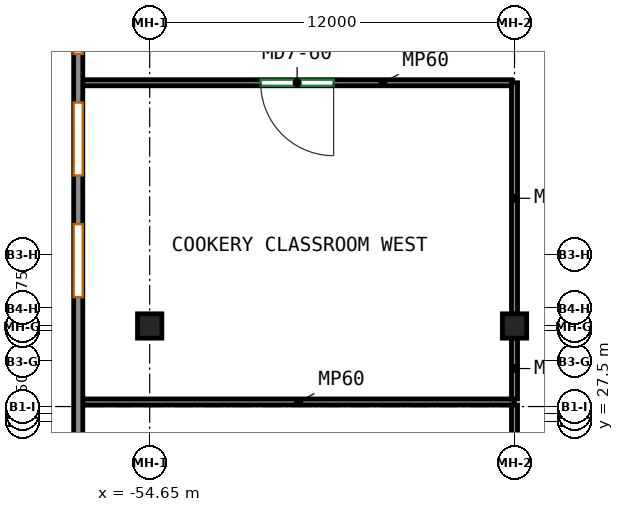
"""IFC4 building model, lengths in metres.
Left out: names, types, materials, properties, quantities, classifications, styles, units other than length and angle.
Written with IfcOpenShell. Run it as: python <this file> out.ifc"""

import sys

from ifc_helpers import new_model, si_unit, direction, frame, frame_2d, origin, origin_2d, place, context, subcontext, project, spatial, rectangle, extrude, source, transform, mapped, element, fill, save


model = new_model("IFC4")
c1 = context("Model", 3, precision=1e-05, world=origin(), true_north=direction((0.0, 1.0)))
c2 = subcontext(c1, "Body", "Model", "MODEL_VIEW")
j1 = project(units=[si_unit("LENGTHUNIT", "METRE"), si_unit("PLANEANGLEUNIT", "RADIAN")], contexts=[c1])
p1 = place(None, origin())
s1 = spatial("IfcSite", under=j1, at=p1, CompositionType="ELEMENT")
p2 = place(p1, origin())
s2 = spatial("IfcBuilding", under=s1, at=p2, CompositionType="ELEMENT")
p3 = place(p2, frame((0.0, 0.0, 13.5)))
s3 = spatial("IfcBuildingStorey", under=s2, at=p3, CompositionType="ELEMENT", Elevation=13.5)
m1 = source(origin(), c2, "Body", "SweptSolid", [
    extrude(rectangle(XDim=0.8, YDim=0.8, at=origin_2d()), origin(), (0.0, 0.0, 1.0), 4.1),
])
for number, where, z_axis, x_axis in (
    (1, (-54.65, 30.65, 0.0), (0.0, 0.0, 1.0), (1.0, 0.0, 0.0)),
    (2, (-42.65, 30.65, 0.0), (0.0, 0.0, 1.0), (1.0, 0.0, 0.0)),
):
    element("IfcColumn", number, at=place(p3, frame(where, z_axis=z_axis, x_axis=x_axis)), inside=s3, PredefinedType="COLUMN", context=c2, shape_type="MappedRepresentation", body=[
        mapped(m1, transform((0.0, 0.0, 0.0))),
    ])
m2 = source(origin(), c2, "Body", "SweptSolid", [
    extrude(rectangle(XDim=100.7, YDim=0.3, at=frame_2d((50.35, 0.0))), origin(), (0.0, 0.0, 1.0), 4.1),
])
p4 = place(p3, frame((-57.0, -43.55, 0.0), z_axis=(0.0, 0.0, 1.0), x_axis=(0.0, 1.0, 0.0)))
e3 = element("IfcWall", 3, at=p4, inside=s3, PredefinedType="SOLIDWALL", context=c2, shape_type="MappedRepresentation", body=[
    mapped(m2, transform((0.0, 0.0, 0.0))),
])
p5 = place(p4, frame((3.15, 0.0, 0.9)))
e4 = element("IfcOpeningElement", 4, at=p5, cuts=e3, PredefinedType="OPENING", context=c2, shape_type="SweptSolid", body=[
    extrude(rectangle(XDim=2.4, YDim=1.8, at=frame_2d((1.2, 0.9))), frame((0.0, 0.16, 0.0), z_axis=(0.0, -1.0, 0.0), x_axis=(1.0, 0.0, 0.0)), (0.0, 0.0, 1.0), 0.32),
])
p6 = place(p4, frame((7.15, 0.0, 0.9)))
e5 = element("IfcOpeningElement", 5, at=p6, cuts=e3, PredefinedType="OPENING", context=c2, shape_type="SweptSolid", body=[
    extrude(rectangle(XDim=2.4, YDim=1.8, at=frame_2d((1.2, 0.9))), frame((0.0, 0.16, 0.0), z_axis=(0.0, -1.0, 0.0), x_axis=(1.0, 0.0, 0.0)), (0.0, 0.0, 1.0), 0.32),
])
p7 = place(p4, frame((11.15, 0.0, 0.9)))
e6 = element("IfcOpeningElement", 6, at=p7, cuts=e3, PredefinedType="OPENING", context=c2, shape_type="SweptSolid", body=[
    extrude(rectangle(XDim=2.4, YDim=1.8, at=frame_2d((1.2, 0.9))), frame((0.0, 0.16, 0.0), z_axis=(0.0, -1.0, 0.0), x_axis=(1.0, 0.0, 0.0)), (0.0, 0.0, 1.0), 0.32),
])
p8 = place(p4, frame((19.15, 0.0, 0.9)))
e7 = element("IfcOpeningElement", 7, at=p8, cuts=e3, PredefinedType="OPENING", context=c2, shape_type="SweptSolid", body=[
    extrude(rectangle(XDim=2.4, YDim=1.8, at=frame_2d((1.2, 0.9))), frame((0.0, 0.16, 0.0), z_axis=(0.0, -1.0, 0.0), x_axis=(1.0, 0.0, 0.0)), (0.0, 0.0, 1.0), 0.32),
])
p9 = place(p4, frame((23.15, 0.0, 0.9)))
e8 = element("IfcOpeningElement", 8, at=p9, cuts=e3, PredefinedType="OPENING", context=c2, shape_type="SweptSolid", body=[
    extrude(rectangle(XDim=2.4, YDim=1.8, at=frame_2d((1.2, 0.9))), frame((0.0, 0.16, 0.0), z_axis=(0.0, -1.0, 0.0), x_axis=(1.0, 0.0, 0.0)), (0.0, 0.0, 1.0), 0.32),
])
p10 = place(p4, frame((27.15, 0.0, 0.9)))
e9 = element("IfcOpeningElement", 9, at=p10, cuts=e3, PredefinedType="OPENING", context=c2, shape_type="SweptSolid", body=[
    extrude(rectangle(XDim=2.4, YDim=1.8, at=frame_2d((1.2, 0.9))), frame((0.0, 0.16, 0.0), z_axis=(0.0, -1.0, 0.0), x_axis=(1.0, 0.0, 0.0)), (0.0, 0.0, 1.0), 0.32),
])
p11 = place(p4, frame((31.15, 0.0, 0.9)))
e10 = element("IfcOpeningElement", 10, at=p11, cuts=e3, PredefinedType="OPENING", context=c2, shape_type="SweptSolid", body=[
    extrude(rectangle(XDim=2.4, YDim=1.8, at=frame_2d((1.2, 0.9))), frame((0.0, 0.16, 0.0), z_axis=(0.0, -1.0, 0.0), x_axis=(1.0, 0.0, 0.0)), (0.0, 0.0, 1.0), 0.32),
])
p12 = place(p4, frame((39.15, 0.0, 0.9)))
e11 = element("IfcOpeningElement", 11, at=p12, cuts=e3, PredefinedType="OPENING", context=c2, shape_type="SweptSolid", body=[
    extrude(rectangle(XDim=2.4, YDim=1.8, at=frame_2d((1.2, 0.9))), frame((0.0, 0.16, 0.0), z_axis=(0.0, -1.0, 0.0), x_axis=(1.0, 0.0, 0.0)), (0.0, 0.0, 1.0), 0.32),
])
p13 = place(p4, frame((43.15, 0.0, 0.9)))
e12 = element("IfcOpeningElement", 12, at=p13, cuts=e3, PredefinedType="OPENING", context=c2, shape_type="SweptSolid", body=[
    extrude(rectangle(XDim=2.4, YDim=1.8, at=frame_2d((1.2, 0.9))), frame((0.0, 0.16, 0.0), z_axis=(0.0, -1.0, 0.0), x_axis=(1.0, 0.0, 0.0)), (0.0, 0.0, 1.0), 0.32),
])
p14 = place(p4, frame((51.15, 0.0, 0.9)))
e13 = element("IfcOpeningElement", 13, at=p14, cuts=e3, PredefinedType="OPENING", context=c2, shape_type="SweptSolid", body=[
    extrude(rectangle(XDim=2.4, YDim=1.8, at=frame_2d((1.2, 0.9))), frame((0.0, 0.16, 0.0), z_axis=(0.0, -1.0, 0.0), x_axis=(1.0, 0.0, 0.0)), (0.0, 0.0, 1.0), 0.32),
])
p15 = place(p4, frame((55.15, 0.0, 0.9)))
e14 = element("IfcOpeningElement", 14, at=p15, cuts=e3, PredefinedType="OPENING", context=c2, shape_type="SweptSolid", body=[
    extrude(rectangle(XDim=2.4, YDim=1.8, at=frame_2d((1.2, 0.9))), frame((0.0, 0.16, 0.0), z_axis=(0.0, -1.0, 0.0), x_axis=(1.0, 0.0, 0.0)), (0.0, 0.0, 1.0), 0.32),
])
p16 = place(p4, frame((59.15, 0.0, 0.9)))
e15 = element("IfcOpeningElement", 15, at=p16, cuts=e3, PredefinedType="OPENING", context=c2, shape_type="SweptSolid", body=[
    extrude(rectangle(XDim=2.4, YDim=1.8, at=frame_2d((1.2, 0.9))), frame((0.0, 0.16, 0.0), z_axis=(0.0, -1.0, 0.0), x_axis=(1.0, 0.0, 0.0)), (0.0, 0.0, 1.0), 0.32),
])
p17 = place(p4, frame((63.15, 0.0, 0.9)))
e16 = element("IfcOpeningElement", 16, at=p17, cuts=e3, PredefinedType="OPENING", context=c2, shape_type="SweptSolid", body=[
    extrude(rectangle(XDim=2.4, YDim=1.8, at=frame_2d((1.2, 0.9))), frame((0.0, 0.16, 0.0), z_axis=(0.0, -1.0, 0.0), x_axis=(1.0, 0.0, 0.0)), (0.0, 0.0, 1.0), 0.32),
])
p18 = place(p4, frame((67.15, 0.0, 0.9)))
e17 = element("IfcOpeningElement", 17, at=p18, cuts=e3, PredefinedType="OPENING", context=c2, shape_type="SweptSolid", body=[
    extrude(rectangle(XDim=2.4, YDim=1.8, at=frame_2d((1.2, 0.9))), frame((0.0, 0.16, 0.0), z_axis=(0.0, -1.0, 0.0), x_axis=(1.0, 0.0, 0.0)), (0.0, 0.0, 1.0), 0.32),
])
p19 = place(p4, frame((75.15, 0.0, 0.9)))
e18 = element("IfcOpeningElement", 18, at=p19, cuts=e3, PredefinedType="OPENING", context=c2, shape_type="SweptSolid", body=[
    extrude(rectangle(XDim=2.4, YDim=1.8, at=frame_2d((1.2, 0.9))), frame((0.0, 0.16, 0.0), z_axis=(0.0, -1.0, 0.0), x_axis=(1.0, 0.0, 0.0)), (0.0, 0.0, 1.0), 0.32),
])
p20 = place(p4, frame((79.15, 0.0, 0.9)))
e19 = element("IfcOpeningElement", 19, at=p20, cuts=e3, PredefinedType="OPENING", context=c2, shape_type="SweptSolid", body=[
    extrude(rectangle(XDim=2.4, YDim=1.8, at=frame_2d((1.2, 0.9))), frame((0.0, 0.16, 0.0), z_axis=(0.0, -1.0, 0.0), x_axis=(1.0, 0.0, 0.0)), (0.0, 0.0, 1.0), 0.32),
])
p21 = place(p4, frame((83.15, 0.0, 0.9)))
e20 = element("IfcOpeningElement", 20, at=p21, cuts=e3, PredefinedType="OPENING", context=c2, shape_type="SweptSolid", body=[
    extrude(rectangle(XDim=2.4, YDim=1.8, at=frame_2d((1.2, 0.9))), frame((0.0, 0.16, 0.0), z_axis=(0.0, -1.0, 0.0), x_axis=(1.0, 0.0, 0.0)), (0.0, 0.0, 1.0), 0.32),
])
p22 = place(p4, frame((87.15, 0.0, 0.9)))
e21 = element("IfcOpeningElement", 21, at=p22, cuts=e3, PredefinedType="OPENING", context=c2, shape_type="SweptSolid", body=[
    extrude(rectangle(XDim=2.4, YDim=1.8, at=frame_2d((1.2, 0.9))), frame((0.0, 0.16, 0.0), z_axis=(0.0, -1.0, 0.0), x_axis=(1.0, 0.0, 0.0)), (0.0, 0.0, 1.0), 0.32),
])
p23 = place(p4, frame((91.15, 0.0, 0.9)))
e22 = element("IfcOpeningElement", 22, at=p23, cuts=e3, PredefinedType="OPENING", context=c2, shape_type="SweptSolid", body=[
    extrude(rectangle(XDim=2.4, YDim=1.8, at=frame_2d((1.2, 0.9))), frame((0.0, 0.16, 0.0), z_axis=(0.0, -1.0, 0.0), x_axis=(1.0, 0.0, 0.0)), (0.0, 0.0, 1.0), 0.32),
])
p24 = place(p4, frame((95.15, 0.0, 0.9)))
e23 = element("IfcOpeningElement", 23, at=p24, cuts=e3, PredefinedType="OPENING", context=c2, shape_type="SweptSolid", body=[
    extrude(rectangle(XDim=2.4, YDim=1.8, at=frame_2d((1.2, 0.9))), frame((0.0, 0.16, 0.0), z_axis=(0.0, -1.0, 0.0), x_axis=(1.0, 0.0, 0.0)), (0.0, 0.0, 1.0), 0.32),
])
m3 = source(origin(), c2, "Body", "SweptSolid", [
    extrude(rectangle(XDim=14.2, YDim=0.2, at=frame_2d((7.1, 0.0))), origin(), (0.0, 0.0, 1.0), 3.3),
])
p25 = place(p3, frame((-56.85, 28.15, 0.0), z_axis=(0.0, 0.0, 1.0), x_axis=(1.0, 0.0, 0.0)))
e24 = element("IfcWall", 24, at=p25, inside=s3, PredefinedType="PARTITIONING", context=c2, shape_type="MappedRepresentation", body=[
    mapped(m3, transform((0.0, 0.0, 0.0))),
])
m4 = source(origin(), c2, "Body", "SweptSolid", [
    extrude(rectangle(XDim=10.3, YDim=0.2, at=frame_2d((5.15, 0.0))), origin(), (0.0, 0.0, 1.0), 3.3),
])
p26 = place(p3, frame((-42.65, 17.75, 0.0), z_axis=(0.0, 0.0, 1.0), x_axis=(0.0, 1.0, 0.0)))
e25 = element("IfcWall", 25, at=p26, inside=s3, PredefinedType="PARTITIONING", context=c2, shape_type="MappedRepresentation", body=[
    mapped(m4, transform((0.0, 0.0, 0.0))),
])
p27 = place(p26, frame((3.95, 0.0, 0.0)))
e26 = element("IfcOpeningElement", 26, at=p27, cuts=e25, PredefinedType="OPENING", context=c2, shape_type="SweptSolid", body=[
    extrude(rectangle(XDim=2.4, YDim=2.4, at=frame_2d((1.2, 1.2))), frame((0.0, 0.11, 0.0), z_axis=(0.0, -1.0, 0.0), x_axis=(1.0, 0.0, 0.0)), (0.0, 0.0, 1.0), 0.22),
])
m5 = source(origin(), c2, "Body", "SweptSolid", [
    extrude(rectangle(XDim=2.0, YDim=0.2, at=frame_2d((1.0, 0.0))), origin(), (0.0, 0.0, 1.0), 3.3),
])
p28 = place(p3, frame((-42.65, 28.25, 0.0), z_axis=(0.0, 0.0, 1.0), x_axis=(0.0, 1.0, 0.0)))
e27 = element("IfcWall", 27, at=p28, inside=s3, PredefinedType="PARTITIONING", context=c2, shape_type="MappedRepresentation", body=[
    mapped(m5, transform((0.0, 0.0, 0.0))),
])
m6 = source(origin(), c2, "Body", "SweptSolid", [
    extrude(rectangle(XDim=7.6, YDim=0.2, at=frame_2d((3.8, 0.0))), origin(), (0.0, 0.0, 1.0), 3.3),
])
p29 = place(p3, frame((-42.65, 31.05, 0.0), z_axis=(0.0, 0.0, 1.0), x_axis=(0.0, 1.0, 0.0)))
e28 = element("IfcWall", 28, at=p29, inside=s3, PredefinedType="PARTITIONING", context=c2, shape_type="MappedRepresentation", body=[
    mapped(m6, transform((0.0, 0.0, 0.0))),
])
m7 = source(origin(), c2, "Body", "SweptSolid", [
    extrude(rectangle(XDim=14.1, YDim=0.2, at=frame_2d((7.05, 0.0))), origin(), (0.0, 0.0, 1.0), 3.3),
])
p30 = place(p3, frame((-42.75, 38.65, 0.0), z_axis=(0.0, 0.0, 1.0), x_axis=(-1.0, 0.0, 0.0)))
e29 = element("IfcWall", 29, at=p30, inside=s3, PredefinedType="PARTITIONING", context=c2, shape_type="MappedRepresentation", body=[
    mapped(m7, transform((0.0, 0.0, 0.0))),
])
p31 = place(p30, frame((5.85, 0.0, 0.0)))
e30 = element("IfcOpeningElement", 30, at=p31, cuts=e29, PredefinedType="OPENING", context=c2, shape_type="SweptSolid", body=[
    extrude(rectangle(XDim=2.4, YDim=2.4, at=frame_2d((1.2, 1.2))), frame((0.0, 0.11, 0.0), z_axis=(0.0, -1.0, 0.0), x_axis=(1.0, 0.0, 0.0)), (0.0, 0.0, 1.0), 0.22),
])
p32 = place(p19, origin())
e31 = element("IfcWindow", 31, at=p32, inside=s3, PartitioningType="SINGLE_PANEL", PredefinedType="WINDOW", context=c2, shape_type="SweptSolid", body=[
    extrude(rectangle(XDim=2.4, YDim=1.8, at=frame_2d((1.2, 0.9))), frame((0.0, 0.03, 0.0), z_axis=(0.0, -1.0, 0.0), x_axis=(1.0, 0.0, 0.0)), (0.0, 0.0, 1.0), 0.06),
])
fill(e18, e31)
p33 = place(p20, origin())
e32 = element("IfcWindow", 32, at=p33, inside=s3, PartitioningType="SINGLE_PANEL", PredefinedType="WINDOW", context=c2, shape_type="SweptSolid", body=[
    extrude(rectangle(XDim=2.4, YDim=1.8, at=frame_2d((1.2, 0.9))), frame((0.0, 0.03, 0.0), z_axis=(0.0, -1.0, 0.0), x_axis=(1.0, 0.0, 0.0)), (0.0, 0.0, 1.0), 0.06),
])
fill(e19, e32)
p34 = place(p21, origin())
e33 = element("IfcWindow", 33, at=p34, inside=s3, PartitioningType="SINGLE_PANEL", PredefinedType="WINDOW", context=c2, shape_type="SweptSolid", body=[
    extrude(rectangle(XDim=2.4, YDim=1.8, at=frame_2d((1.2, 0.9))), frame((0.0, 0.03, 0.0), z_axis=(0.0, -1.0, 0.0), x_axis=(1.0, 0.0, 0.0)), (0.0, 0.0, 1.0), 0.06),
])
fill(e20, e33)
p35 = place(p31, origin())
e34 = element("IfcDoor", 34, at=p35, inside=s3, OperationType="DOUBLE_DOOR_SINGLE_SWING", PredefinedType="DOOR", context=c2, shape_type="SweptSolid", body=[
    extrude(rectangle(XDim=2.4, YDim=2.4, at=frame_2d((1.2, 1.2))), frame((0.0, 0.025, 0.0), z_axis=(0.0, -1.0, 0.0), x_axis=(1.0, 0.0, 0.0)), (0.0, 0.0, 1.0), 0.05),
])
fill(e30, e34)
save(model, sys.argv[1])
